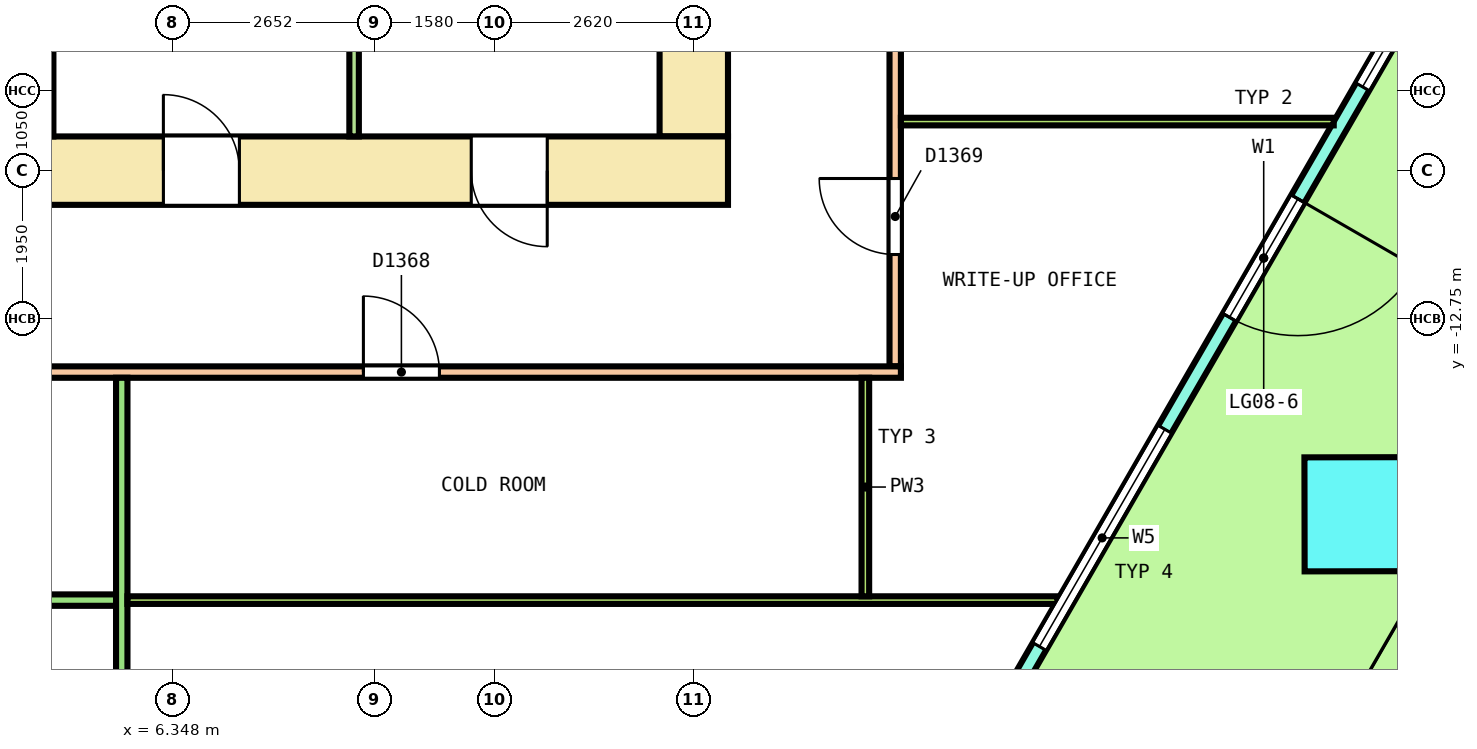
"""IFC4 building model, lengths in metres.
Left out: names, types, materials, properties, quantities, classifications, styles, units other than length and angle.
Written with IfcOpenShell. Run it as: python <this file> out.ifc"""

import sys

from ifc_helpers import new_model, si_unit, direction, frame, frame_2d, origin, origin_2d, place, context, subcontext, project, spatial, polyline, rectangle, outline, extrude, element, fill, save


model = new_model("IFC4")
c1 = context("Model", 3, precision=1e-05, world=origin(), true_north=direction((0.0, 1.0)))
c2 = subcontext(c1, "Body", "Model", "MODEL_VIEW")
j1 = project(units=[si_unit("LENGTHUNIT", "METRE"), si_unit("PLANEANGLEUNIT", "RADIAN")], contexts=[c1])
p1 = place(None, origin())
s1 = spatial("IfcSite", under=j1, at=p1, CompositionType="ELEMENT")
p2 = place(p1, origin())
s2 = spatial("IfcBuilding", under=s1, at=p2, CompositionType="ELEMENT")
p3 = place(p2, frame((0.0, 0.0, 36.6)))
s3 = spatial("IfcBuildingStorey", under=s2, at=p3, CompositionType="ELEMENT", Elevation=36.6)
p4 = place(p3, frame((21.985, -15.321, 0.0), z_axis=(-0.003616977835, -0.006269428248, 0.999973805527), x_axis=(0.498177151135, 0.867045061108, 0.007237962107)))
e1 = element("IfcColumn", 1, at=p4, inside=s3, PredefinedType="COLUMN", context=c2, shape_type="SweptSolid", body=[
    extrude(rectangle(XDim=1.5, YDim=1.5, at=origin_2d()), origin(), (0.0, 0.0, 1.0), 4.05),
])
p5 = place(p3, frame((15.384, -21.154, 0.0), z_axis=(0.0, 0.0, 1.0), x_axis=(0.499998188434, 0.86602644969, 0.0)))
e2 = element("IfcWall", 2, at=p5, inside=s3, PredefinedType="SOLIDWALL", context=c2, shape_type="SweptSolid", body=[
    extrude(outline(polyline([(-0.027, -0.1), (0.988, -0.1), (2.003, -0.1), (3.017, -0.1), (4.032, -0.1), (5.047, -0.1), (6.062, -0.1), (7.076, -0.1), (8.091, -0.1), (9.106, -0.1), (10.121, -0.1), (11.135, -0.1), (12.15, -0.1), (13.165, -0.1), (14.179, -0.1), (15.194, -0.1), (16.209, -0.1), (17.224, -0.1), (18.239, -0.1), (19.253, -0.1), (20.268, -0.1), (21.283, -0.1), (21.229, 0.1), (20.219, 0.1), (19.21, 0.1), (18.2, 0.1), (17.19, 0.1), (16.181, 0.1), (15.171, 0.1), (14.162, 0.1), (13.152, 0.1), (12.142, 0.1), (11.133, 0.1), (10.123, 0.1), (9.114, 0.1), (8.104, 0.1), (7.094, 0.1), (6.085, 0.1), (5.075, 0.1), (4.065, 0.1), (3.056, 0.1), (2.046, 0.1), (1.036, 0.1), (0.027, 0.1), (-0.027, -0.1)])), origin(), (0.0, 0.0, 1.0), 4.1),
])
p6 = place(p5, frame((0.476, 0.0, 0.1)))
e3 = element("IfcOpeningElement", 3, at=p6, cuts=e2, PredefinedType="OPENING", context=c2, shape_type="SweptSolid", body=[
    extrude(rectangle(XDim=3.3, YDim=2.9, at=frame_2d((1.65, 1.45))), frame((0.0, 0.11, 0.0), z_axis=(0.0, -1.0, 0.0), x_axis=(1.0, 0.0, 0.0)), (0.0, 0.0, 1.0), 0.22),
])
p7 = place(p5, frame((4.727, 0.0, 0.1)))
e4 = element("IfcOpeningElement", 4, at=p7, cuts=e2, PredefinedType="OPENING", context=c2, shape_type="SweptSolid", body=[
    extrude(rectangle(XDim=3.3, YDim=2.9, at=frame_2d((1.65, 1.45))), frame((0.0, 0.11, 0.0), z_axis=(0.0, -1.0, 0.0), x_axis=(1.0, 0.0, 0.0)), (0.0, 0.0, 1.0), 0.22),
])
p8 = place(p5, frame((9.728, 0.0, 0.0)))
e5 = element("IfcOpeningElement", 5, at=p8, cuts=e2, PredefinedType="OPENING", context=c2, shape_type="SweptSolid", body=[
    extrude(rectangle(XDim=1.8, YDim=2.4, at=frame_2d((0.9, 1.2))), frame((0.0, 0.11, 0.0), z_axis=(0.0, -1.0, 0.0), x_axis=(1.0, 0.0, 0.0)), (0.0, 0.0, 1.0), 0.22),
])
p9 = place(p5, frame((9.728, 0.0, 2.55)))
e6 = element("IfcOpeningElement", 6, at=p9, cuts=e2, PredefinedType="OPENING", context=c2, shape_type="SweptSolid", body=[
    extrude(rectangle(XDim=1.8, YDim=0.45, at=frame_2d((0.9, 0.225))), frame((0.0, 0.11, 0.0), z_axis=(0.0, -1.0, 0.0), x_axis=(1.0, 0.0, 0.0)), (0.0, 0.0, 1.0), 0.22),
])
p10 = place(p5, frame((13.229, 0.0, 0.1)))
e7 = element("IfcOpeningElement", 7, at=p10, cuts=e2, PredefinedType="OPENING", context=c2, shape_type="SweptSolid", body=[
    extrude(rectangle(XDim=3.3, YDim=2.9, at=frame_2d((1.65, 1.45))), frame((0.0, 0.11, 0.0), z_axis=(0.0, -1.0, 0.0), x_axis=(1.0, 0.0, 0.0)), (0.0, 0.0, 1.0), 0.22),
])
p11 = place(p5, frame((17.48, 0.0, 0.1)))
e8 = element("IfcOpeningElement", 8, at=p11, cuts=e2, PredefinedType="OPENING", context=c2, shape_type="SweptSolid", body=[
    extrude(rectangle(XDim=3.3, YDim=2.9, at=frame_2d((1.65, 1.45))), frame((0.0, 0.11, 0.0), z_axis=(0.0, -1.0, 0.0), x_axis=(1.0, 0.0, 0.0)), (0.0, 0.0, 1.0), 0.22),
])
p12 = place(p3, frame((-13.65, -10.8, 0.0), z_axis=(0.0, 0.0, 1.0), x_axis=(1.0, 0.0, 0.0)))
e9 = element("IfcWall", 9, at=p12, inside=s3, PredefinedType="SHEAR", context=c2, shape_type="SweptSolid", body=[
    extrude(rectangle(XDim=27.3, YDim=0.9, at=frame_2d((13.65, 0.0))), origin(), (0.0, 0.0, 1.0), 4.1),
])
p13 = place(p12, frame((3.453, 0.0, 0.0)))
e10 = element("IfcOpeningElement", 10, at=p13, cuts=e9, PredefinedType="OPENING", context=c2, shape_type="SweptSolid", body=[
    extrude(rectangle(XDim=1.0, YDim=2.1, at=frame_2d((0.5, 1.05))), frame((0.0, 0.46, 0.0), z_axis=(0.0, -1.0, 0.0), x_axis=(1.0, 0.0, 0.0)), (0.0, 0.0, 1.0), 0.92),
])
p14 = place(p12, frame((9.653, 0.0, 0.0)))
e11 = element("IfcOpeningElement", 11, at=p14, cuts=e9, PredefinedType="OPENING", context=c2, shape_type="SweptSolid", body=[
    extrude(rectangle(XDim=1.0, YDim=2.1, at=frame_2d((0.5, 1.05))), frame((0.0, 0.46, 0.0), z_axis=(0.0, -1.0, 0.0), x_axis=(1.0, 0.0, 0.0)), (0.0, 0.0, 1.0), 0.92),
])
p15 = place(p12, frame((19.872, 0.0, 0.0)))
e12 = element("IfcOpeningElement", 12, at=p15, cuts=e9, PredefinedType="OPENING", context=c2, shape_type="SweptSolid", body=[
    extrude(rectangle(XDim=1.0, YDim=2.1, at=frame_2d((0.5, 1.05))), frame((0.0, 0.46, 0.0), z_axis=(0.0, -1.0, 0.0), x_axis=(1.0, 0.0, 0.0)), (0.0, 0.0, 1.0), 0.92),
])
p16 = place(p12, frame((23.922, 0.0, 0.0)))
e13 = element("IfcOpeningElement", 13, at=p16, cuts=e9, PredefinedType="OPENING", context=c2, shape_type="SweptSolid", body=[
    extrude(rectangle(XDim=1.0, YDim=2.1, at=frame_2d((0.5, 1.05))), frame((0.0, 0.46, 0.0), z_axis=(0.0, -1.0, 0.0), x_axis=(1.0, 0.0, 0.0)), (0.0, 0.0, 1.0), 0.92),
])
p17 = place(p12, frame((15.2, 0.0, 0.0)))
e14 = element("IfcOpeningElement", 14, at=p17, cuts=e9, PredefinedType="OPENING", context=c2, shape_type="SweptSolid", body=[
    extrude(rectangle(XDim=1.2, YDim=2.1, at=frame_2d((0.6, 1.05))), frame((0.0, 0.46, 0.0), z_axis=(0.0, -1.0, 0.0), x_axis=(1.0, 0.0, 0.0)), (0.0, 0.0, 1.0), 0.92),
])
p18 = place(p3, frame((13.2, -10.35, 0.0), z_axis=(0.0, 0.0, 1.0), x_axis=(0.0, 1.0, 0.0)))
e15 = element("IfcWall", 15, at=p18, inside=s3, PredefinedType="SHEAR", context=c2, shape_type="SweptSolid", body=[
    extrude(rectangle(XDim=20.7, YDim=0.9, at=frame_2d((10.35, 0.0))), origin(), (0.0, 0.0, 1.0), 4.1),
])
p19 = place(p18, frame((9.15, 0.0, 0.0)))
e16 = element("IfcOpeningElement", 16, at=p19, cuts=e15, PredefinedType="OPENING", context=c2, shape_type="SweptSolid", body=[
    extrude(rectangle(XDim=2.4, YDim=2.1, at=frame_2d((1.2, 1.05))), frame((0.0, 0.46, 0.0), z_axis=(0.0, -1.0, 0.0), x_axis=(1.0, 0.0, 0.0)), (0.0, 0.0, 1.0), 0.92),
])
p20 = place(p18, frame((16.05, 0.0, 0.0)))
e17 = element("IfcOpeningElement", 17, at=p20, cuts=e15, PredefinedType="OPENING", context=c2, shape_type="SweptSolid", body=[
    extrude(rectangle(XDim=1.2, YDim=2.1, at=frame_2d((0.6, 1.05))), frame((0.0, 0.46, 0.0), z_axis=(0.0, -1.0, 0.0), x_axis=(1.0, 0.0, 0.0)), (0.0, 0.0, 1.0), 0.92),
])
p21 = place(p18, frame((2.819, 0.0, 0.0)))
e18 = element("IfcOpeningElement", 18, at=p21, cuts=e15, PredefinedType="OPENING", context=c2, shape_type="SweptSolid", body=[
    extrude(rectangle(XDim=1.0, YDim=2.1, at=frame_2d((0.5, 1.05))), frame((0.0, 0.46, 0.0), z_axis=(0.0, -1.0, 0.0), x_axis=(1.0, 0.0, 0.0)), (0.0, 0.0, 1.0), 0.92),
])
p22 = place(p18, frame((4.281, 0.0, 0.0)))
e19 = element("IfcOpeningElement", 19, at=p22, cuts=e15, PredefinedType="OPENING", context=c2, shape_type="SweptSolid", body=[
    extrude(rectangle(XDim=1.0, YDim=2.1, at=frame_2d((0.5, 1.05))), frame((0.0, 0.46, 0.0), z_axis=(0.0, -1.0, 0.0), x_axis=(1.0, 0.0, 0.0)), (0.0, 0.0, 1.0), 0.92),
])
for number, where, z_axis, x_axis in (
    (20, (4.712, -10.35, 0.0), (0.0, 0.0, 1.0), (0.0, 1.0, 0.0)),
    (21, (8.731, -10.35, 0.0), (0.0, 0.0, 1.0), (0.0, 1.0, 0.0)),
):
    element("IfcWall", number, at=place(p3, frame(where, z_axis=z_axis, x_axis=x_axis)), inside=s3, PredefinedType="PARTITIONING", context=c2, shape_type="SweptSolid", body=[
        extrude(rectangle(XDim=1.85, YDim=0.125, at=frame_2d((0.925, 0.0))), origin(), (0.0, 0.0, 1.0), 4.1),
    ])
p23 = place(p3, frame((15.85, -13.375, 0.0), z_axis=(0.0, 0.0, 1.0), x_axis=(0.0, 1.0, 0.0)))
e22 = element("IfcWall", 22, at=p23, inside=s3, PredefinedType="PARTITIONING", context=c2, shape_type="SweptSolid", body=[
    extrude(rectangle(XDim=26.75, YDim=0.15, at=frame_2d((13.375, 0.0))), origin(), (0.0, 0.0, 1.0), 3.05),
])
p24 = place(p23, frame((14.351, 0.0, 0.0)))
e23 = element("IfcOpeningElement", 23, at=p24, cuts=e22, PredefinedType="OPENING", context=c2, shape_type="SweptSolid", body=[
    extrude(rectangle(XDim=1.0, YDim=2.1, at=frame_2d((0.5, 1.05))), frame((0.0, 0.085, 0.0), z_axis=(0.0, -1.0, 0.0), x_axis=(1.0, 0.0, 0.0)), (0.0, 0.0, 1.0), 0.17),
])
p25 = place(p23, frame((18.775, 0.0, 0.0)))
e24 = element("IfcOpeningElement", 24, at=p25, cuts=e22, PredefinedType="OPENING", context=c2, shape_type="SweptSolid", body=[
    extrude(rectangle(XDim=1.2, YDim=2.1, at=frame_2d((0.6, 1.05))), frame((0.0, 0.085, 0.0), z_axis=(0.0, -1.0, 0.0), x_axis=(1.0, 0.0, 0.0)), (0.0, 0.0, 1.0), 0.17),
])
p26 = place(p23, frame((24.798, 0.0, 0.0)))
e25 = element("IfcOpeningElement", 25, at=p26, cuts=e22, PredefinedType="OPENING", context=c2, shape_type="SweptSolid", body=[
    extrude(rectangle(XDim=1.0, YDim=2.1, at=frame_2d((0.5, 1.05))), frame((0.0, 0.085, 0.0), z_axis=(0.0, -1.0, 0.0), x_axis=(1.0, 0.0, 0.0)), (0.0, 0.0, 1.0), 0.17),
])
p27 = place(p23, frame((1.472, 0.0, 0.0)))
e26 = element("IfcOpeningElement", 26, at=p27, cuts=e22, PredefinedType="OPENING", context=c2, shape_type="SweptSolid", body=[
    extrude(rectangle(XDim=1.0, YDim=2.1, at=frame_2d((0.5, 1.05))), frame((0.0, 0.085, 0.0), z_axis=(0.0, -1.0, 0.0), x_axis=(1.0, 0.0, 0.0)), (0.0, 0.0, 1.0), 0.17),
])
p28 = place(p23, frame((4.865, 0.0, 0.0)))
e27 = element("IfcOpeningElement", 27, at=p28, cuts=e22, PredefinedType="OPENING", context=c2, shape_type="SweptSolid", body=[
    extrude(rectangle(XDim=1.0, YDim=2.1, at=frame_2d((0.5, 1.05))), frame((0.0, 0.085, 0.0), z_axis=(0.0, -1.0, 0.0), x_axis=(1.0, 0.0, 0.0)), (0.0, 0.0, 1.0), 0.17),
])
p29 = place(p23, frame((8.754, 0.0, 0.0)))
e28 = element("IfcOpeningElement", 28, at=p29, cuts=e22, PredefinedType="OPENING", context=c2, shape_type="SweptSolid", body=[
    extrude(rectangle(XDim=1.0, YDim=2.1, at=frame_2d((0.5, 1.05))), frame((0.0, 0.085, 0.0), z_axis=(0.0, -1.0, 0.0), x_axis=(1.0, 0.0, 0.0)), (0.0, 0.0, 1.0), 0.17),
])
p30 = place(p3, frame((-15.925, -13.45, 0.0), z_axis=(0.0, 0.0, 1.0), x_axis=(1.0, 0.0, 0.0)))
e29 = element("IfcWall", 29, at=p30, inside=s3, PredefinedType="PARTITIONING", context=c2, shape_type="SweptSolid", body=[
    extrude(rectangle(XDim=31.85, YDim=0.15, at=frame_2d((15.925, 0.0))), origin(), (0.0, 0.0, 1.0), 3.05),
])
p31 = place(p30, frame((0.848, 0.0, 0.0)))
e30 = element("IfcOpeningElement", 30, at=p31, cuts=e29, PredefinedType="OPENING", context=c2, shape_type="SweptSolid", body=[
    extrude(rectangle(XDim=1.0, YDim=2.1, at=frame_2d((0.5, 1.05))), frame((0.0, 0.085, 0.0), z_axis=(0.0, -1.0, 0.0), x_axis=(1.0, 0.0, 0.0)), (0.0, 0.0, 1.0), 0.17),
])
p32 = place(p30, frame((5.088, 0.0, 0.0)))
e31 = element("IfcOpeningElement", 31, at=p32, cuts=e29, PredefinedType="OPENING", context=c2, shape_type="SweptSolid", body=[
    extrude(rectangle(XDim=1.0, YDim=2.1, at=frame_2d((0.5, 1.05))), frame((0.0, 0.085, 0.0), z_axis=(0.0, -1.0, 0.0), x_axis=(1.0, 0.0, 0.0)), (0.0, 0.0, 1.0), 0.17),
])
p33 = place(p30, frame((13.013, 0.0, 0.0)))
e32 = element("IfcOpeningElement", 32, at=p33, cuts=e29, PredefinedType="OPENING", context=c2, shape_type="SweptSolid", body=[
    extrude(rectangle(XDim=1.0, YDim=2.1, at=frame_2d((0.5, 1.05))), frame((0.0, 0.085, 0.0), z_axis=(0.0, -1.0, 0.0), x_axis=(1.0, 0.0, 0.0)), (0.0, 0.0, 1.0), 0.17),
])
p34 = place(p30, frame((24.778, 0.0, 0.0)))
e33 = element("IfcOpeningElement", 33, at=p34, cuts=e29, PredefinedType="OPENING", context=c2, shape_type="SweptSolid", body=[
    extrude(rectangle(XDim=1.0, YDim=2.1, at=frame_2d((0.5, 1.05))), frame((0.0, 0.085, 0.0), z_axis=(0.0, -1.0, 0.0), x_axis=(1.0, 0.0, 0.0)), (0.0, 0.0, 1.0), 0.17),
])
p35 = place(p3, frame((-17.985, -16.45, 0.0), z_axis=(0.0, 0.0, 1.0), x_axis=(1.0, 0.0, 0.0)))
e34 = element("IfcWall", 34, at=p35, inside=s3, PredefinedType="PARTITIONING", context=c2, shape_type="SweptSolid", body=[
    extrude(rectangle(XDim=23.584, YDim=0.15, at=frame_2d((11.792, 0.0))), origin(), (0.0, 0.0, 1.0), 3.05),
])
p36 = place(p35, frame((2.264, 0.0, 0.0)))
e35 = element("IfcOpeningElement", 35, at=p36, cuts=e34, PredefinedType="OPENING", context=c2, shape_type="SweptSolid", body=[
    extrude(rectangle(XDim=1.0, YDim=2.1, at=frame_2d((0.5, 1.05))), frame((0.0, 0.085, 0.0), z_axis=(0.0, -1.0, 0.0), x_axis=(1.0, 0.0, 0.0)), (0.0, 0.0, 1.0), 0.17),
])
p37 = place(p35, frame((9.539, 0.0, 0.0)))
e36 = element("IfcOpeningElement", 36, at=p37, cuts=e34, PredefinedType="OPENING", context=c2, shape_type="SweptSolid", body=[
    extrude(rectangle(XDim=1.2, YDim=2.1, at=frame_2d((0.6, 1.05))), frame((0.0, 0.085, 0.0), z_axis=(0.0, -1.0, 0.0), x_axis=(1.0, 0.0, 0.0)), (0.0, 0.0, 1.0), 0.17),
])
p38 = place(p35, frame((19.747, 0.0, 0.0)))
e37 = element("IfcOpeningElement", 37, at=p38, cuts=e34, PredefinedType="OPENING", context=c2, shape_type="SweptSolid", body=[
    extrude(rectangle(XDim=1.2, YDim=2.1, at=frame_2d((0.6, 1.05))), frame((0.0, 0.085, 0.0), z_axis=(0.0, -1.0, 0.0), x_axis=(1.0, 0.0, 0.0)), (0.0, 0.0, 1.0), 0.17),
])
p39 = place(p3, frame((5.674, -24.491, 0.0), z_axis=(0.0, 0.0, 1.0), x_axis=(0.0, 1.0, 0.0)))
e38 = element("IfcWall", 38, at=p39, inside=s3, PredefinedType="PARTITIONING", context=c2, shape_type="SweptSolid", body=[
    extrude(rectangle(XDim=10.967, YDim=0.15, at=frame_2d((5.483, 0.0))), origin(), (0.0, 0.0, 1.0), 3.05),
])
p40 = place(p39, frame((3.521, 0.0, 0.0)))
e39 = element("IfcOpeningElement", 39, at=p40, cuts=e38, PredefinedType="OPENING", context=c2, shape_type="SweptSolid", body=[
    extrude(rectangle(XDim=1.0, YDim=2.1, at=frame_2d((0.5, 1.05))), frame((0.0, 0.085, 0.0), z_axis=(0.0, -1.0, 0.0), x_axis=(1.0, 0.0, 0.0)), (0.0, 0.0, 1.0), 0.17),
])
p41 = place(p3, frame((5.749, -16.45, 0.0), z_axis=(0.0, 0.0, 1.0), x_axis=(1.0, 0.0, 0.0)))
e40 = element("IfcWall", 40, at=p41, inside=s3, PredefinedType="PARTITIONING", context=c2, shape_type="SweptSolid", body=[
    extrude(rectangle(XDim=12.235, YDim=0.1, at=frame_2d((6.118, 0.0))), origin(), (0.0, 0.0, 1.0), 3.05),
])
p42 = place(p3, frame((15.457, -16.4, 0.0), z_axis=(0.0, 0.0, 1.0), x_axis=(0.0, 1.0, 0.0)))
e41 = element("IfcWall", 41, at=p42, inside=s3, PredefinedType="PARTITIONING", context=c2, shape_type="SweptSolid", body=[
    extrude(rectangle(XDim=2.875, YDim=0.1, at=frame_2d((1.438, 0.0))), origin(), (0.0, 0.0, 1.0), 3.05),
])
p43 = place(p3, frame((15.925, -10.155, 0.0), z_axis=(0.0, 0.0, 1.0), x_axis=(1.0, 0.0, 0.0)))
e42 = element("IfcWall", 42, at=p43, inside=s3, PredefinedType="PARTITIONING", context=c2, shape_type="SweptSolid", body=[
    extrude(rectangle(XDim=5.694, YDim=0.1, at=frame_2d((2.847, 0.0))), origin(), (0.0, 0.0, 1.0), 3.05),
])
p44 = place(p7, origin())
e43 = element("IfcWindow", 43, at=p44, inside=s3, PartitioningType="SINGLE_PANEL", PredefinedType="WINDOW", context=c2, shape_type="SweptSolid", body=[
    extrude(rectangle(XDim=3.3, YDim=2.9, at=frame_2d((1.65, 1.45))), frame((0.0, 0.03, 0.0), z_axis=(0.0, -1.0, 0.0), x_axis=(1.0, 0.0, 0.0)), (0.0, 0.0, 1.0), 0.06),
])
fill(e4, e43)
p45 = place(p8, origin())
e44 = element("IfcDoor", 44, at=p45, inside=s3, OperationType="DOUBLE_DOOR_SINGLE_SWING", PredefinedType="DOOR", context=c2, shape_type="SweptSolid", body=[
    extrude(rectangle(XDim=1.8, YDim=2.4, at=frame_2d((0.9, 1.2))), frame((0.0, 0.025, 0.0), z_axis=(0.0, -1.0, 0.0), x_axis=(1.0, 0.0, 0.0)), (0.0, 0.0, 1.0), 0.05),
])
fill(e5, e44)
p46 = place(p9, origin())
e45 = element("IfcWindow", 45, at=p46, inside=s3, PartitioningType="SINGLE_PANEL", PredefinedType="WINDOW", context=c2, shape_type="SweptSolid", body=[
    extrude(rectangle(XDim=1.8, YDim=0.45, at=frame_2d((0.9, 0.225))), frame((0.0, 0.03, 0.0), z_axis=(0.0, -1.0, 0.0), x_axis=(1.0, 0.0, 0.0)), (0.0, 0.0, 1.0), 0.06),
])
fill(e6, e45)
p47 = place(p10, origin())
e46 = element("IfcWindow", 46, at=p47, inside=s3, PartitioningType="SINGLE_PANEL", PredefinedType="WINDOW", context=c2, shape_type="SweptSolid", body=[
    extrude(rectangle(XDim=3.3, YDim=2.9, at=frame_2d((1.65, 1.45))), frame((0.0, 0.03, 0.0), z_axis=(0.0, -1.0, 0.0), x_axis=(1.0, 0.0, 0.0)), (0.0, 0.0, 1.0), 0.06),
])
fill(e7, e46)
p48 = place(p15, origin())
e47 = element("IfcDoor", 47, at=p48, inside=s3, OperationType="SINGLE_SWING_LEFT", PredefinedType="DOOR", context=c2, shape_type="SweptSolid", body=[
    extrude(rectangle(XDim=1.0, YDim=2.1, at=frame_2d((0.5, 1.05))), frame((0.0, 0.3, 0.0), z_axis=(0.0, -1.0, 0.0), x_axis=(1.0, 0.0, 0.0)), (0.0, 0.0, 1.0), 0.6),
])
fill(e12, e47)
p49 = place(p16, origin())
e48 = element("IfcDoor", 48, at=p49, inside=s3, OperationType="SINGLE_SWING_RIGHT", PredefinedType="DOOR", context=c2, shape_type="SweptSolid", body=[
    extrude(rectangle(XDim=1.0, YDim=2.1, at=frame_2d((0.5, 1.05))), frame((0.0, 0.3, 0.0), z_axis=(0.0, -1.0, 0.0), x_axis=(1.0, 0.0, 0.0)), (0.0, 0.0, 1.0), 0.6),
])
fill(e13, e48)
p50 = place(p34, origin())
e49 = element("IfcDoor", 49, at=p50, inside=s3, OperationType="SINGLE_SWING_LEFT", PredefinedType="DOOR", context=c2, shape_type="SweptSolid", body=[
    extrude(rectangle(XDim=1.0, YDim=2.1, at=frame_2d((0.5, 1.05))), frame((0.0, 0.025, 0.0), z_axis=(0.0, -1.0, 0.0), x_axis=(1.0, 0.0, 0.0)), (0.0, 0.0, 1.0), 0.05),
])
fill(e33, e49)
p51 = place(p27, origin())
e50 = element("IfcDoor", 50, at=p51, inside=s3, OperationType="SINGLE_SWING_RIGHT", PredefinedType="DOOR", context=c2, shape_type="SweptSolid", body=[
    extrude(rectangle(XDim=1.0, YDim=2.1, at=frame_2d((0.5, 1.05))), frame((0.0, 0.025, 0.0), z_axis=(0.0, -1.0, 0.0), x_axis=(1.0, 0.0, 0.0)), (0.0, 0.0, 1.0), 0.05),
])
fill(e26, e50)
save(model, sys.argv[1])
